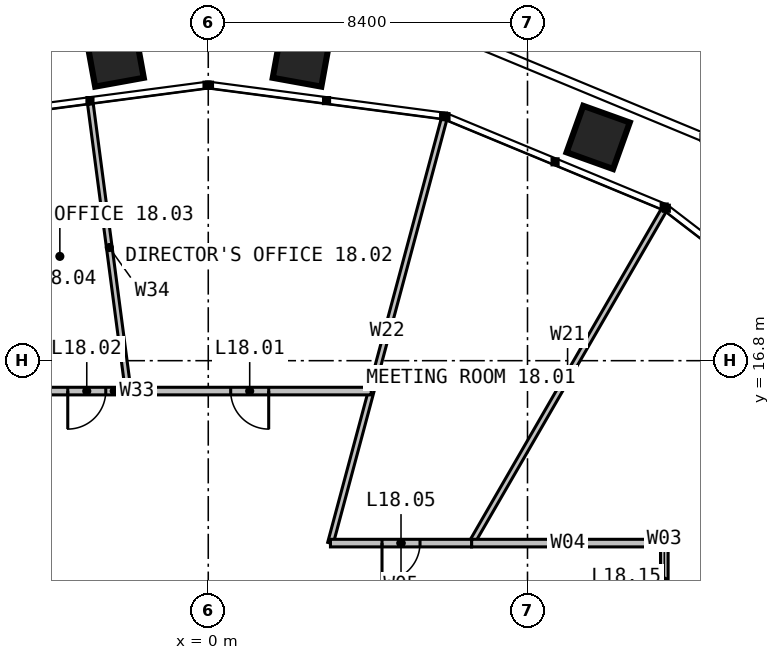
"""IFC4 building model, lengths in metres.
Left out: names, types, materials, properties, quantities, classifications, styles, units other than length and angle.
Written with IfcOpenShell. Run it as: python <this file> out.ifc"""

import sys

from ifc_helpers import new_model, si_unit, direction, frame, frame_2d, origin, place, context, subcontext, project, spatial, rectangle, extrude, element, fill, save


model = new_model("IFC4")
c1 = context("Model", 3, precision=1e-05, world=origin(), true_north=direction((0.0, 1.0)))
c2 = subcontext(c1, "Body", "Model", "MODEL_VIEW")
j1 = project(units=[si_unit("LENGTHUNIT", "METRE"), si_unit("PLANEANGLEUNIT", "RADIAN")], contexts=[c1])
p1 = place(None, origin())
s1 = spatial("IfcSite", under=j1, at=p1, CompositionType="ELEMENT")
p2 = place(p1, origin())
s2 = spatial("IfcBuilding", under=s1, at=p2, CompositionType="ELEMENT")
p3 = place(p2, frame((0.0, 0.0, 77.0)))
s3 = spatial("IfcBuildingStorey", under=s2, at=p3, CompositionType="ELEMENT", Elevation=77.0)
p4 = place(p3, frame((6.928, 12.0, 0.0), z_axis=(0.0, 0.0, 1.0), x_axis=(0.500002673408, 0.866023860286, 0.0)))
e1 = element("IfcWall", 1, at=p4, inside=s3, PredefinedType="PARTITIONING", context=c2, shape_type="SweptSolid", body=[
    extrude(rectangle(XDim=10.106, YDim=0.15, at=frame_2d((5.053, 0.0))), origin(), (0.0, 0.0, 1.0), 2.79),
])
p5 = place(p3, frame((3.215, 12.0, 0.0), z_axis=(0.0, 0.0, 1.0), x_axis=(0.258825273624, 0.96592415734, 0.0)))
e2 = element("IfcWall", 2, at=p5, inside=s3, PredefinedType="PARTITIONING", context=c2, shape_type="SweptSolid", body=[
    extrude(rectangle(XDim=11.539, YDim=0.15, at=frame_2d((5.77, 0.0))), origin(), (0.0, 0.0, 1.0), 2.79),
])
p6 = place(p3, frame((12.0, 10.0, 0.0), z_axis=(0.0, 0.0, 1.0), x_axis=(0.0, 1.0, 0.0)))
e3 = element("IfcWall", 3, at=p6, inside=s3, PredefinedType="PARTITIONING", context=c2, shape_type="SweptSolid", body=[
    extrude(rectangle(XDim=2.0, YDim=0.2, at=frame_2d((1.0, 0.0))), origin(), (0.0, 0.0, 1.0), 3.8),
])
p7 = place(p3, frame((12.0, 12.0, 0.0), z_axis=(0.0, 0.0, 1.0), x_axis=(-1.0, 0.0, 0.0)))
e4 = element("IfcWall", 4, at=p7, inside=s3, PredefinedType="PARTITIONING", context=c2, shape_type="SweptSolid", body=[
    extrude(rectangle(XDim=5.072, YDim=0.2, at=frame_2d((2.536, 0.0))), origin(), (0.0, 0.0, 1.0), 3.8),
])
p8 = place(p3, frame((6.928, 12.0, 0.0), z_axis=(0.0, 0.0, 1.0), x_axis=(-1.0, 0.0, 0.0)))
e5 = element("IfcWall", 5, at=p8, inside=s3, PredefinedType="PARTITIONING", context=c2, shape_type="SweptSolid", body=[
    extrude(rectangle(XDim=3.713, YDim=0.2, at=frame_2d((1.856, 0.0))), origin(), (0.0, 0.0, 1.0), 3.8),
])
p9 = place(p8, frame((1.356, 0.0, 0.0)))
e6 = element("IfcOpeningElement", 6, at=p9, cuts=e5, PredefinedType="OPENING", context=c2, shape_type="SweptSolid", body=[
    extrude(rectangle(XDim=1.0, YDim=2.2, at=frame_2d((0.5, 1.1))), frame((0.0, 0.11, 0.0), z_axis=(0.0, -1.0, 0.0), x_axis=(1.0, 0.0, 0.0)), (0.0, 0.0, 1.0), 0.22),
])
p10 = place(p3, frame((4.287, 16.0, 0.0), z_axis=(0.0, 0.0, 1.0), x_axis=(-1.0, 0.0, 0.0)))
e7 = element("IfcWall", 7, at=p10, inside=s3, PredefinedType="PARTITIONING", context=c2, shape_type="SweptSolid", body=[
    extrude(rectangle(XDim=13.525, YDim=0.2, at=frame_2d((6.762, 0.0))), origin(), (0.0, 0.0, 1.0), 3.8),
])
p11 = place(p10, frame((2.697, 0.0, 0.0)))
e8 = element("IfcOpeningElement", 8, at=p11, cuts=e7, PredefinedType="OPENING", context=c2, shape_type="SweptSolid", body=[
    extrude(rectangle(XDim=1.0, YDim=2.2, at=frame_2d((0.5, 1.1))), frame((0.0, 0.11, 0.0), z_axis=(0.0, -1.0, 0.0), x_axis=(1.0, 0.0, 0.0)), (0.0, 0.0, 1.0), 0.22),
])
p12 = place(p10, frame((6.984, 0.0, 0.0)))
e9 = element("IfcOpeningElement", 9, at=p12, cuts=e7, PredefinedType="OPENING", context=c2, shape_type="SweptSolid", body=[
    extrude(rectangle(XDim=1.0, YDim=2.2, at=frame_2d((0.5, 1.1))), frame((0.0, 0.11, 0.0), z_axis=(0.0, -1.0, 0.0), x_axis=(1.0, 0.0, 0.0)), (0.0, 0.0, 1.0), 0.22),
])
p13 = place(p10, frame((9.244, 0.0, 0.0)))
e10 = element("IfcOpeningElement", 10, at=p13, cuts=e7, PredefinedType="OPENING", context=c2, shape_type="SweptSolid", body=[
    extrude(rectangle(XDim=1.0, YDim=2.2, at=frame_2d((0.5, 1.1))), frame((0.0, 0.11, 0.0), z_axis=(0.0, -1.0, 0.0), x_axis=(1.0, 0.0, 0.0)), (0.0, 0.0, 1.0), 0.22),
])
p14 = place(p10, frame((11.72, 0.0, 0.0)))
e11 = element("IfcOpeningElement", 11, at=p14, cuts=e7, PredefinedType="OPENING", context=c2, shape_type="SweptSolid", body=[
    extrude(rectangle(XDim=1.0, YDim=2.2, at=frame_2d((0.5, 1.1))), frame((0.0, 0.11, 0.0), z_axis=(0.0, -1.0, 0.0), x_axis=(1.0, 0.0, 0.0)), (0.0, 0.0, 1.0), 0.22),
])
p15 = place(p3, frame((-2.106, 16.0, 0.0), z_axis=(0.0, 0.0, 1.0), x_axis=(-0.130511705759, 0.991446768445, 0.0)))
e12 = element("IfcWall", 12, at=p15, inside=s3, PredefinedType="PARTITIONING", context=c2, shape_type="SweptSolid", body=[
    extrude(rectangle(XDim=7.619, YDim=0.15, at=frame_2d((3.81, 0.0))), origin(), (0.0, 0.0, 1.0), 2.79),
])
p16 = place(p9, origin())
e13 = element("IfcDoor", 13, at=p16, inside=s3, OperationType="SINGLE_SWING_RIGHT", PredefinedType="DOOR", context=c2, shape_type="SweptSolid", body=[
    extrude(rectangle(XDim=1.0, YDim=2.2, at=frame_2d((0.5, 1.1))), frame((0.0, 0.025, 0.0), z_axis=(0.0, -1.0, 0.0), x_axis=(1.0, 0.0, 0.0)), (0.0, 0.0, 1.0), 0.05),
])
fill(e6, e13)
p17 = place(p11, origin())
e14 = element("IfcDoor", 14, at=p17, inside=s3, OperationType="SINGLE_SWING_LEFT", PredefinedType="DOOR", context=c2, shape_type="SweptSolid", body=[
    extrude(rectangle(XDim=1.0, YDim=2.2, at=frame_2d((0.5, 1.1))), frame((0.0, 0.025, 0.0), z_axis=(0.0, -1.0, 0.0), x_axis=(1.0, 0.0, 0.0)), (0.0, 0.0, 1.0), 0.05),
])
fill(e8, e14)
p18 = place(p12, origin())
e15 = element("IfcDoor", 15, at=p18, inside=s3, OperationType="SINGLE_SWING_RIGHT", PredefinedType="DOOR", context=c2, shape_type="SweptSolid", body=[
    extrude(rectangle(XDim=1.0, YDim=2.2, at=frame_2d((0.5, 1.1))), frame((0.0, 0.025, 0.0), z_axis=(0.0, -1.0, 0.0), x_axis=(1.0, 0.0, 0.0)), (0.0, 0.0, 1.0), 0.05),
])
fill(e9, e15)
save(model, sys.argv[1])
